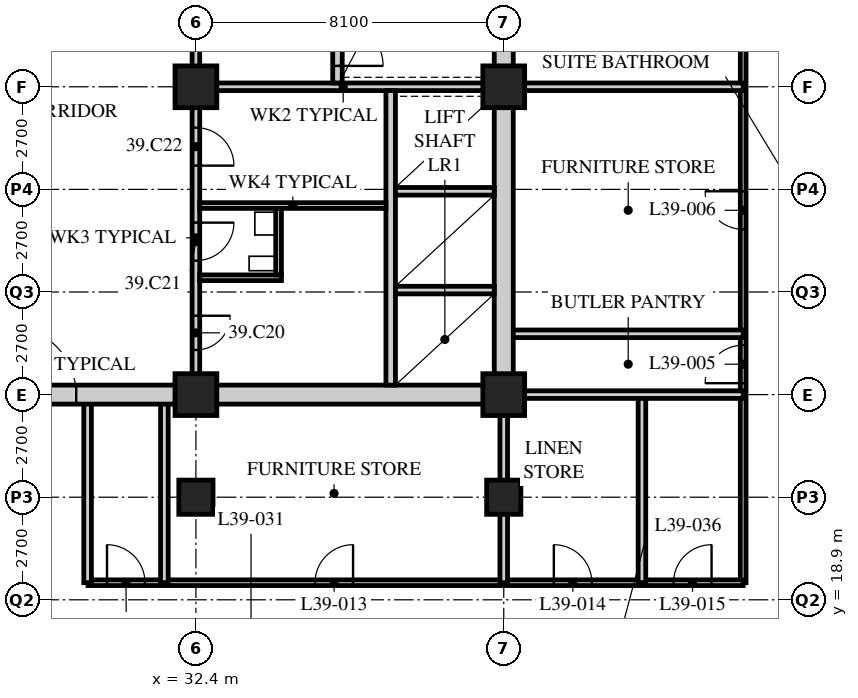
"""IFC4 building model, lengths in metres.
Left out: names, types, materials, properties, quantities, classifications, styles, units other than length and angle.
Written with IfcOpenShell. Run it as: python <this file> out.ifc"""

import sys

from ifc_helpers import new_model, si_unit, direction, frame, frame_2d, origin, origin_2d, place, context, subcontext, project, spatial, rectangle, hollow_rectangle, extrude, element, fill, save


model = new_model("IFC4")
c1 = context("Model", 3, precision=1e-05, world=origin(), true_north=direction((0.0, 1.0)))
c2 = subcontext(c1, "Body", "Model", "MODEL_VIEW")
j1 = project(units=[si_unit("LENGTHUNIT", "METRE"), si_unit("PLANEANGLEUNIT", "RADIAN")], contexts=[c1])
p1 = place(None, origin())
s1 = spatial("IfcSite", under=j1, at=p1, CompositionType="ELEMENT")
p2 = place(p1, origin())
s2 = spatial("IfcBuilding", under=s1, at=p2, CompositionType="ELEMENT")
p3 = place(p2, frame((0.0, 0.0, 151.0)))
s3 = spatial("IfcBuildingStorey", under=s2, at=p3, CompositionType="ELEMENT", Elevation=151.0)
p4 = place(p3, frame((32.4, 21.6, 0.0), z_axis=(0.0, 0.0, 1.0), x_axis=(1.0, 0.0, 0.0)))
e1 = element("IfcColumn", 1, at=p4, inside=s3, PredefinedType="COLUMN", context=c2, shape_type="SweptSolid", body=[
    extrude(hollow_rectangle(XDim=0.9, YDim=0.9, WallThickness=0.1, at=origin_2d()), origin(), (0.0, 0.0, 1.0), 3.4),
])
for number, where, z_axis, x_axis in (
    (2, (32.4, 24.3, 0.0), (0.0, 0.0, 1.0), (1.0, 0.0, 0.0)),
    (3, (32.4, 32.4, 0.0), (0.0, 0.0, 1.0), (1.0, 0.0, 0.0)),
):
    element("IfcColumn", number, at=place(p3, frame(where, z_axis=z_axis, x_axis=x_axis)), inside=s3, PredefinedType="COLUMN", context=c2, shape_type="SweptSolid", body=[
        extrude(hollow_rectangle(XDim=1.1, YDim=1.1, WallThickness=0.1, at=origin_2d()), origin(), (0.0, 0.0, 1.0), 3.4),
    ])
p5 = place(p3, frame((40.5, 21.6, 0.0), z_axis=(0.0, 0.0, 1.0), x_axis=(1.0, 0.0, 0.0)))
e4 = element("IfcColumn", 4, at=p5, inside=s3, PredefinedType="COLUMN", context=c2, shape_type="SweptSolid", body=[
    extrude(hollow_rectangle(XDim=0.9, YDim=0.9, WallThickness=0.1, at=origin_2d()), origin(), (0.0, 0.0, 1.0), 3.4),
])
for number, where, z_axis, x_axis in (
    (5, (40.5, 24.3, 0.0), (0.0, 0.0, 1.0), (1.0, 0.0, 0.0)),
    (6, (40.5, 32.4, 0.0), (0.0, 0.0, 1.0), (1.0, 0.0, 0.0)),
):
    element("IfcColumn", number, at=place(p3, frame(where, z_axis=z_axis, x_axis=x_axis)), inside=s3, PredefinedType="COLUMN", context=c2, shape_type="SweptSolid", body=[
        extrude(hollow_rectangle(XDim=1.1, YDim=1.1, WallThickness=0.1, at=origin_2d()), origin(), (0.0, 0.0, 1.0), 3.4),
    ])
p6 = place(p3, frame((46.8, 19.35, 0.0), z_axis=(0.0, 0.0, 1.0), x_axis=(0.0, 1.0, 0.0)))
e7 = element("IfcWall", 7, at=p6, inside=s3, PredefinedType="PARTITIONING", context=c2, shape_type="SweptSolid", body=[
    extrude(rectangle(XDim=24.75, YDim=0.15, at=frame_2d((12.375, 0.0))), origin(), (0.0, 0.0, 1.0), 3.19),
])
p7 = place(p6, frame((5.25, 0.0, 0.0)))
e8 = element("IfcOpeningElement", 8, at=p7, cuts=e7, PredefinedType="OPENING", context=c2, shape_type="SweptSolid", body=[
    extrude(rectangle(XDim=1.0, YDim=2.1, at=frame_2d((0.5, 1.05))), frame((0.0, 0.085, 0.0), z_axis=(0.0, -1.0, 0.0), x_axis=(1.0, 0.0, 0.0)), (0.0, 0.0, 1.0), 0.17),
])
p8 = place(p6, frame((9.3, 0.0, 0.0)))
e9 = element("IfcOpeningElement", 9, at=p8, cuts=e7, PredefinedType="OPENING", context=c2, shape_type="SweptSolid", body=[
    extrude(rectangle(XDim=1.0, YDim=2.1, at=frame_2d((0.5, 1.05))), frame((0.0, 0.085, 0.0), z_axis=(0.0, -1.0, 0.0), x_axis=(1.0, 0.0, 0.0)), (0.0, 0.0, 1.0), 0.17),
])
p9 = place(p6, frame((16.6, 0.0, 0.0)))
e10 = element("IfcOpeningElement", 10, at=p9, cuts=e7, PredefinedType="OPENING", context=c2, shape_type="SweptSolid", body=[
    extrude(rectangle(XDim=1.0, YDim=2.1, at=frame_2d((0.5, 1.05))), frame((0.0, 0.085, 0.0), z_axis=(0.0, -1.0, 0.0), x_axis=(1.0, 0.0, 0.0)), (0.0, 0.0, 1.0), 0.17),
])
p10 = place(p3, frame((29.56, 19.35, 0.0), z_axis=(0.0, 0.0, 1.0), x_axis=(1.0, 0.0, 0.0)))
e11 = element("IfcWall", 11, at=p10, inside=s3, PredefinedType="PARTITIONING", context=c2, shape_type="SweptSolid", body=[
    extrude(rectangle(XDim=17.24, YDim=0.15, at=frame_2d((8.62, 0.0))), origin(), (0.0, 0.0, 1.0), 3.19),
])
p11 = place(p10, frame((0.5, 0.0, 0.0)))
e12 = element("IfcOpeningElement", 12, at=p11, cuts=e11, PredefinedType="OPENING", context=c2, shape_type="SweptSolid", body=[
    extrude(rectangle(XDim=1.0, YDim=2.1, at=frame_2d((0.5, 1.05))), frame((0.0, 0.085, 0.0), z_axis=(0.0, -1.0, 0.0), x_axis=(1.0, 0.0, 0.0)), (0.0, 0.0, 1.0), 0.17),
])
p12 = place(p10, frame((5.975, 0.0, 0.0)))
e13 = element("IfcOpeningElement", 13, at=p12, cuts=e11, PredefinedType="OPENING", context=c2, shape_type="SweptSolid", body=[
    extrude(rectangle(XDim=1.0, YDim=2.1, at=frame_2d((0.5, 1.05))), frame((0.0, 0.085, 0.0), z_axis=(0.0, -1.0, 0.0), x_axis=(1.0, 0.0, 0.0)), (0.0, 0.0, 1.0), 0.17),
])
p13 = place(p10, frame((12.258, 0.0, 0.0)))
e14 = element("IfcOpeningElement", 14, at=p13, cuts=e11, PredefinedType="OPENING", context=c2, shape_type="SweptSolid", body=[
    extrude(rectangle(XDim=1.0, YDim=2.1, at=frame_2d((0.5, 1.05))), frame((0.0, 0.085, 0.0), z_axis=(0.0, -1.0, 0.0), x_axis=(1.0, 0.0, 0.0)), (0.0, 0.0, 1.0), 0.17),
])
p14 = place(p10, frame((15.408, 0.0, 0.0)))
e15 = element("IfcOpeningElement", 15, at=p14, cuts=e11, PredefinedType="OPENING", context=c2, shape_type="SweptSolid", body=[
    extrude(rectangle(XDim=1.0, YDim=2.1, at=frame_2d((0.5, 1.05))), frame((0.0, 0.085, 0.0), z_axis=(0.0, -1.0, 0.0), x_axis=(1.0, 0.0, 0.0)), (0.0, 0.0, 1.0), 0.17),
])
for number, where, z_axis, x_axis in (
    (16, (40.5, 32.4, 0.0), (0.0, 0.0, 1.0), (1.0, 0.0, 0.0)),
    (17, (46.8, 25.9, 0.0), (0.0, 0.0, 1.0), (-1.0, 0.0, 0.0)),
):
    element("IfcWall", number, at=place(p3, frame(where, z_axis=z_axis, x_axis=x_axis)), inside=s3, PredefinedType="SOLIDWALL", context=c2, shape_type="SweptSolid", body=[
        extrude(rectangle(XDim=6.3, YDim=0.2, at=frame_2d((3.15, 0.0))), origin(), (0.0, 0.0, 1.0), 3.19),
    ])
p15 = place(p3, frame((40.5, 19.35, 0.0), z_axis=(0.0, 0.0, 1.0), x_axis=(0.0, 1.0, 0.0)))
e18 = element("IfcWall", 18, at=p15, inside=s3, PredefinedType="SOLIDWALL", context=c2, shape_type="SweptSolid", body=[
    extrude(rectangle(XDim=4.95, YDim=0.2, at=frame_2d((2.475, 0.0))), origin(), (0.0, 0.0, 1.0), 2.42),
])
for number, where, z_axis, x_axis in (
    (19, (31.57, 19.35, 0.0), (0.0, 0.0, 1.0), (0.0, 1.0, 0.0)),
    (20, (44.136, 19.35, 0.0), (0.0, 0.0, 1.0), (0.0, 1.0, 0.0)),
    (21, (29.55, 19.35, 0.0), (0.0, 0.0, 1.0), (0.0, 1.0, 0.0)),
):
    element("IfcWall", number, at=place(p3, frame(where, z_axis=z_axis, x_axis=x_axis)), inside=s3, PredefinedType="SOLIDWALL", context=c2, shape_type="SweptSolid", body=[
        extrude(rectangle(XDim=4.95, YDim=0.2, at=frame_2d((2.475, 0.0))), origin(), (0.0, 0.0, 1.0), 3.19),
    ])
p16 = place(p3, frame((40.5, 24.3, 0.0), z_axis=(0.0, 0.0, 1.0), x_axis=(1.0, 0.0, 0.0)))
e22 = element("IfcWall", 22, at=p16, inside=s3, PredefinedType="SOLIDWALL", context=c2, shape_type="SweptSolid", body=[
    extrude(rectangle(XDim=6.3, YDim=0.2, at=frame_2d((3.15, 0.0))), origin(), (0.0, 0.0, 1.0), 3.19),
])
p17 = place(p3, frame((15.95, 24.3, 0.0), z_axis=(0.0, 0.0, 1.0), x_axis=(1.0, 0.0, 0.0)))
e23 = element("IfcWall", 23, at=p17, inside=s3, PredefinedType="SOLIDWALL", context=c2, shape_type="SweptSolid", body=[
    extrude(rectangle(XDim=24.8, YDim=0.5, at=frame_2d((12.4, 0.0))), origin(), (0.0, 0.0, 1.0), 2.42),
])
p18 = place(p17, frame((11.5, 0.0, 0.0)))
e24 = element("IfcOpeningElement", 24, at=p18, cuts=e23, PredefinedType="OPENING", context=c2, shape_type="SweptSolid", body=[
    extrude(rectangle(XDim=1.8, YDim=2.4, at=frame_2d((0.9, 1.2))), frame((0.0, 0.26, 0.0), z_axis=(0.0, -1.0, 0.0), x_axis=(1.0, 0.0, 0.0)), (0.0, 0.0, 1.0), 0.52),
])
p19 = place(p3, frame((40.5, 24.55, 0.0), z_axis=(0.0, 0.0, 1.0), x_axis=(0.0, 1.0, 0.0)))
e25 = element("IfcWall", 25, at=p19, inside=s3, PredefinedType="SOLIDWALL", context=c2, shape_type="SweptSolid", body=[
    extrude(rectangle(XDim=15.7, YDim=0.5, at=frame_2d((7.85, 0.0))), origin(), (0.0, 0.0, 1.0), 2.42),
])
p20 = place(p3, frame((32.3, 32.4, 0.0), z_axis=(0.0, 0.0, 1.0), x_axis=(1.0, 0.0, 0.0)))
e26 = element("IfcWall", 26, at=p20, inside=s3, PredefinedType="SOLIDWALL", context=c2, shape_type="SweptSolid", body=[
    extrude(rectangle(XDim=7.95, YDim=0.2, at=frame_2d((3.975, 0.0))), origin(), (0.0, 0.0, 1.0), 2.578),
])
p21 = place(p3, frame((32.4, 32.5, 0.0), z_axis=(0.0, 0.0, 1.0), x_axis=(0.0, 1.0, 0.0)))
e27 = element("IfcWall", 27, at=p21, inside=s3, PredefinedType="SOLIDWALL", context=c2, shape_type="SweptSolid", body=[
    extrude(rectangle(XDim=7.75, YDim=0.2, at=frame_2d((3.875, 0.0))), origin(), (0.0, 0.0, 1.0), 2.578),
])
p22 = place(p21, frame((1.9, 0.0, 0.0)))
e28 = element("IfcOpeningElement", 28, at=p22, cuts=e27, PredefinedType="OPENING", context=c2, shape_type="SweptSolid", body=[
    extrude(rectangle(XDim=1.2, YDim=2.1, at=frame_2d((0.6, 1.05))), frame((0.0, 0.11, 0.0), z_axis=(0.0, -1.0, 0.0), x_axis=(1.0, 0.0, 0.0)), (0.0, 0.0, 1.0), 0.22),
])
p23 = place(p3, frame((37.525, 24.55, 0.0), z_axis=(0.0, 0.0, 1.0), x_axis=(0.0, 1.0, 0.0)))
e29 = element("IfcWall", 29, at=p23, inside=s3, PredefinedType="SOLIDWALL", context=c2, shape_type="SweptSolid", body=[
    extrude(rectangle(XDim=7.75, YDim=0.25, at=frame_2d((3.875, 0.0))), origin(), (0.0, 0.0, 1.0), 3.19),
])
for number, where, z_axis, x_axis in (
    (30, (37.65, 27.05, 0.0), (0.0, 0.0, 1.0), (1.0, 0.0, 0.0)),
    (31, (37.65, 29.65, 0.0), (0.0, 0.0, 1.0), (1.0, 0.0, 0.0)),
):
    element("IfcWall", number, at=place(p3, frame(where, z_axis=z_axis, x_axis=x_axis)), inside=s3, PredefinedType="SOLIDWALL", context=c2, shape_type="SweptSolid", body=[
        extrude(rectangle(XDim=2.6, YDim=0.2, at=frame_2d((1.3, 0.0))), origin(), (0.0, 0.0, 1.0), 3.19),
    ])
p24 = place(p3, frame((36.125, 32.5, 0.0), z_axis=(0.0, 0.0, 1.0), x_axis=(0.0, 1.0, 0.0)))
e32 = element("IfcWall", 32, at=p24, inside=s3, PredefinedType="SOLIDWALL", context=c2, shape_type="SweptSolid", body=[
    extrude(rectangle(XDim=7.75, YDim=0.25, at=frame_2d((3.875, 0.0))), origin(), (0.0, 0.0, 1.0), 3.19),
])
p25 = place(p24, frame((0.45, 0.0, 0.0)))
e33 = element("IfcOpeningElement", 33, at=p25, cuts=e32, PredefinedType="OPENING", context=c2, shape_type="SweptSolid", body=[
    extrude(rectangle(XDim=1.2, YDim=2.1, at=frame_2d((0.6, 1.05))), frame((0.0, 0.135, 0.0), z_axis=(0.0, -1.0, 0.0), x_axis=(1.0, 0.0, 0.0)), (0.0, 0.0, 1.0), 0.27),
])
p26 = place(p3, frame((32.4, 24.55, 0.0), z_axis=(0.0, 0.0, 1.0), x_axis=(0.0, 1.0, 0.0)))
e34 = element("IfcWall", 34, at=p26, inside=s3, PredefinedType="PARTITIONING", context=c2, shape_type="SweptSolid", body=[
    extrude(rectangle(XDim=7.75, YDim=0.2, at=frame_2d((3.875, 0.0))), origin(), (0.0, 0.0, 1.0), 2.578),
])
p27 = place(p26, frame((0.925, 0.0, 0.0)))
e35 = element("IfcOpeningElement", 35, at=p27, cuts=e34, PredefinedType="OPENING", context=c2, shape_type="SweptSolid", body=[
    extrude(rectangle(XDim=0.9, YDim=2.1, at=frame_2d((0.45, 1.05))), frame((0.0, 0.11, 0.0), z_axis=(0.0, -1.0, 0.0), x_axis=(1.0, 0.0, 0.0)), (0.0, 0.0, 1.0), 0.22),
])
p28 = place(p26, frame((3.275, 0.0, 0.0)))
e36 = element("IfcOpeningElement", 36, at=p28, cuts=e34, PredefinedType="OPENING", context=c2, shape_type="SweptSolid", body=[
    extrude(rectangle(XDim=1.0, YDim=2.1, at=frame_2d((0.5, 1.05))), frame((0.0, 0.11, 0.0), z_axis=(0.0, -1.0, 0.0), x_axis=(1.0, 0.0, 0.0)), (0.0, 0.0, 1.0), 0.22),
])
p29 = place(p26, frame((5.775, 0.0, 0.0)))
e37 = element("IfcOpeningElement", 37, at=p29, cuts=e34, PredefinedType="OPENING", context=c2, shape_type="SweptSolid", body=[
    extrude(rectangle(XDim=1.0, YDim=2.1, at=frame_2d((0.5, 1.05))), frame((0.0, 0.11, 0.0), z_axis=(0.0, -1.0, 0.0), x_axis=(1.0, 0.0, 0.0)), (0.0, 0.0, 1.0), 0.22),
])
p30 = place(p3, frame((32.5, 27.375, 0.0), z_axis=(0.0, 0.0, 1.0), x_axis=(1.0, 0.0, 0.0)))
e38 = element("IfcWall", 38, at=p30, inside=s3, PredefinedType="PARTITIONING", context=c2, shape_type="SweptSolid", body=[
    extrude(rectangle(XDim=2.15, YDim=0.15, at=frame_2d((1.075, 0.0))), origin(), (0.0, 0.0, 1.0), 3.19),
])
p31 = place(p3, frame((32.5, 29.275, 0.0), z_axis=(0.0, 0.0, 1.0), x_axis=(1.0, 0.0, 0.0)))
e39 = element("IfcWall", 39, at=p31, inside=s3, PredefinedType="PARTITIONING", context=c2, shape_type="SweptSolid", body=[
    extrude(rectangle(XDim=4.9, YDim=0.15, at=frame_2d((2.45, 0.0))), origin(), (0.0, 0.0, 1.0), 3.19),
])
p32 = place(p3, frame((34.575, 27.45, 0.0), z_axis=(0.0, 0.0, 1.0), x_axis=(0.0, 1.0, 0.0)))
e40 = element("IfcWall", 40, at=p32, inside=s3, PredefinedType="PARTITIONING", context=c2, shape_type="SweptSolid", body=[
    extrude(rectangle(XDim=1.75, YDim=0.15, at=frame_2d((0.875, 0.0))), origin(), (0.0, 0.0, 1.0), 3.19),
])
p33 = place(p7, origin())
e41 = element("IfcDoor", 41, at=p33, inside=s3, OperationType="SINGLE_SWING_LEFT", PredefinedType="DOOR", context=c2, shape_type="SweptSolid", body=[
    extrude(rectangle(XDim=1.0, YDim=2.1, at=frame_2d((0.5, 1.05))), frame((0.0, 0.025, 0.0), z_axis=(0.0, -1.0, 0.0), x_axis=(1.0, 0.0, 0.0)), (0.0, 0.0, 1.0), 0.05),
])
fill(e8, e41)
p34 = place(p8, origin())
e42 = element("IfcDoor", 42, at=p34, inside=s3, OperationType="SINGLE_SWING_RIGHT", PredefinedType="DOOR", context=c2, shape_type="SweptSolid", body=[
    extrude(rectangle(XDim=1.0, YDim=2.1, at=frame_2d((0.5, 1.05))), frame((0.0, 0.025, 0.0), z_axis=(0.0, -1.0, 0.0), x_axis=(1.0, 0.0, 0.0)), (0.0, 0.0, 1.0), 0.05),
])
fill(e9, e42)
p35 = place(p11, origin())
e43 = element("IfcDoor", 43, at=p35, inside=s3, OperationType="SINGLE_SWING_LEFT", PredefinedType="DOOR", context=c2, shape_type="SweptSolid", body=[
    extrude(rectangle(XDim=1.0, YDim=2.1, at=frame_2d((0.5, 1.05))), frame((0.0, 0.025, 0.0), z_axis=(0.0, -1.0, 0.0), x_axis=(1.0, 0.0, 0.0)), (0.0, 0.0, 1.0), 0.05),
])
fill(e12, e43)
p36 = place(p12, origin())
e44 = element("IfcDoor", 44, at=p36, inside=s3, OperationType="SINGLE_SWING_RIGHT", PredefinedType="DOOR", context=c2, shape_type="SweptSolid", body=[
    extrude(rectangle(XDim=1.0, YDim=2.1, at=frame_2d((0.5, 1.05))), frame((0.0, 0.025, 0.0), z_axis=(0.0, -1.0, 0.0), x_axis=(1.0, 0.0, 0.0)), (0.0, 0.0, 1.0), 0.05),
])
fill(e13, e44)
p37 = place(p13, origin())
e45 = element("IfcDoor", 45, at=p37, inside=s3, OperationType="SINGLE_SWING_LEFT", PredefinedType="DOOR", context=c2, shape_type="SweptSolid", body=[
    extrude(rectangle(XDim=1.0, YDim=2.1, at=frame_2d((0.5, 1.05))), frame((0.0, 0.025, 0.0), z_axis=(0.0, -1.0, 0.0), x_axis=(1.0, 0.0, 0.0)), (0.0, 0.0, 1.0), 0.05),
])
fill(e14, e45)
p38 = place(p14, origin())
e46 = element("IfcDoor", 46, at=p38, inside=s3, OperationType="SINGLE_SWING_RIGHT", PredefinedType="DOOR", context=c2, shape_type="SweptSolid", body=[
    extrude(rectangle(XDim=1.0, YDim=2.1, at=frame_2d((0.5, 1.05))), frame((0.0, 0.025, 0.0), z_axis=(0.0, -1.0, 0.0), x_axis=(1.0, 0.0, 0.0)), (0.0, 0.0, 1.0), 0.05),
])
fill(e15, e46)
p39 = place(p27, origin())
e47 = element("IfcDoor", 47, at=p39, inside=s3, OperationType="SINGLE_SWING_LEFT", PredefinedType="DOOR", context=c2, shape_type="SweptSolid", body=[
    extrude(rectangle(XDim=0.9, YDim=2.1, at=frame_2d((0.45, 1.05))), frame((0.0, 0.025, 0.0), z_axis=(0.0, -1.0, 0.0), x_axis=(1.0, 0.0, 0.0)), (0.0, 0.0, 1.0), 0.05),
])
fill(e35, e47)
p40 = place(p28, origin())
e48 = element("IfcDoor", 48, at=p40, inside=s3, OperationType="SINGLE_SWING_LEFT", PredefinedType="DOOR", context=c2, shape_type="SweptSolid", body=[
    extrude(rectangle(XDim=1.0, YDim=2.1, at=frame_2d((0.5, 1.05))), frame((0.0, 0.025, 0.0), z_axis=(0.0, -1.0, 0.0), x_axis=(1.0, 0.0, 0.0)), (0.0, 0.0, 1.0), 0.05),
])
fill(e36, e48)
p41 = place(p29, origin())
e49 = element("IfcDoor", 49, at=p41, inside=s3, OperationType="SINGLE_SWING_RIGHT", PredefinedType="DOOR", context=c2, shape_type="SweptSolid", body=[
    extrude(rectangle(XDim=1.0, YDim=2.1, at=frame_2d((0.5, 1.05))), frame((0.0, 0.025, 0.0), z_axis=(0.0, -1.0, 0.0), x_axis=(1.0, 0.0, 0.0)), (0.0, 0.0, 1.0), 0.05),
])
fill(e37, e49)
p42 = place(p25, origin())
e50 = element("IfcDoor", 50, at=p42, inside=s3, OperationType="SINGLE_SWING_RIGHT", PredefinedType="DOOR", context=c2, shape_type="SweptSolid", body=[
    extrude(rectangle(XDim=1.2, YDim=2.1, at=frame_2d((0.6, 1.05))), frame((0.0, 0.025, 0.0), z_axis=(0.0, -1.0, 0.0), x_axis=(1.0, 0.0, 0.0)), (0.0, 0.0, 1.0), 0.05),
])
fill(e33, e50)
p43 = place(p18, origin())
e51 = element("IfcDoor", 51, at=p43, inside=s3, OperationType="DOUBLE_DOOR_SINGLE_SWING", PredefinedType="DOOR", context=c2, shape_type="SweptSolid", body=[
    extrude(rectangle(XDim=1.8, YDim=2.4, at=frame_2d((0.9, 1.2))), frame((0.0, 0.025, 0.0), z_axis=(0.0, -1.0, 0.0), x_axis=(1.0, 0.0, 0.0)), (0.0, 0.0, 1.0), 0.05),
])
fill(e24, e51)
save(model, sys.argv[1])
